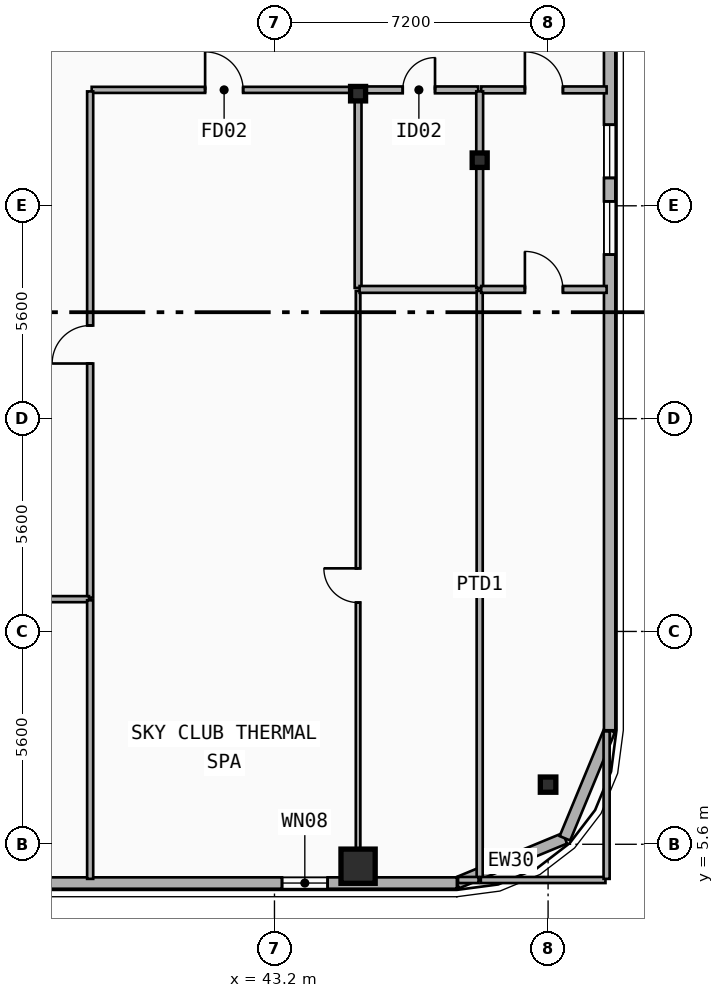
"""IFC4 building model, lengths in metres.
Left out: names, types, materials, properties, quantities, classifications, styles, units other than length and angle.
Written with IfcOpenShell. Run it as: python <this file> out.ifc"""

import sys

from ifc_helpers import new_model, si_unit, direction, frame, frame_2d, origin, origin_2d, place, context, subcontext, project, spatial, rectangle, i_section, extrude, element, fill, save


model = new_model("IFC4")
c1 = context("Model", 3, precision=1e-05, world=origin(), true_north=direction((0.0, 1.0)))
c2 = subcontext(c1, "Body", "Model", "MODEL_VIEW")
j1 = project(units=[si_unit("LENGTHUNIT", "METRE"), si_unit("PLANEANGLEUNIT", "RADIAN")], contexts=[c1])
p1 = place(None, origin())
s1 = spatial("IfcSite", under=j1, at=p1, CompositionType="ELEMENT")
p2 = place(p1, origin())
s2 = spatial("IfcBuilding", under=s1, at=p2, CompositionType="ELEMENT")
p3 = place(p2, frame((0.0, 0.0, 232.8)))
s3 = spatial("IfcBuildingStorey", under=s2, at=p3, CompositionType="ELEMENT", Elevation=232.8)
p4 = place(p3, frame((45.4, 25.35, 0.0), z_axis=(0.0, 0.0, 1.0), x_axis=(1.0, 0.0, 0.0)))
e1 = element("IfcColumn", 1, at=p4, inside=s3, PredefinedType="COLUMN", context=c2, shape_type="SweptSolid", body=[
    extrude(i_section(OverallWidth=0.395, OverallDepth=0.38, WebThickness=0.019, FlangeThickness=0.03, FilletRadius=0.015, at=origin_2d()), origin(), (0.0, 0.0, 1.0), 3.6),
])
p5 = place(p3, frame((45.4, 5.132, 0.0), z_axis=(0.0, -0.090237335163, 0.995920289653), x_axis=(1.0, 0.0, 0.0)))
e2 = element("IfcColumn", 2, at=p5, inside=s3, PredefinedType="COLUMN", context=c2, shape_type="SweptSolid", body=[
    extrude(rectangle(XDim=0.9, YDim=0.9, at=origin_2d()), origin(), (0.0, 0.0, 1.0), 3.615),
])
p6 = place(p3, frame((48.6, 23.6, 0.0), z_axis=(0.0, 0.0, 1.0), x_axis=(1.0, 0.0, 0.0)))
e3 = element("IfcColumn", 3, at=p6, inside=s3, PredefinedType="COLUMN", context=c2, shape_type="SweptSolid", body=[
    extrude(i_section(OverallWidth=0.395, OverallDepth=0.38, WebThickness=0.019, FlangeThickness=0.03, FilletRadius=0.015, at=origin_2d()), origin(), (0.0, 0.0, 1.0), 3.6),
])
p7 = place(p3, frame((50.4, 7.266, 0.0), z_axis=(0.0, -0.079906436036, 0.996802368316), x_axis=(1.0, 0.0, 0.0)))
e4 = element("IfcColumn", 4, at=p7, inside=s3, PredefinedType="COLUMN", context=c2, shape_type="SweptSolid", body=[
    extrude(i_section(OverallWidth=0.408, OverallDepth=0.4, WebThickness=0.025, FlangeThickness=0.039, FilletRadius=0.015, at=origin_2d()), origin(), (0.0, 0.0, 1.0), 3.611),
])
p8 = place(p3, frame((50.843, 5.757, 0.0), z_axis=(0.0, 0.0, 1.0), x_axis=(-0.92389884758, -0.382636798336, 0.0)))
e5 = element("IfcWall", 5, at=p8, inside=s3, PredefinedType="SOLIDWALL", context=c2, shape_type="SweptSolid", body=[
    extrude(rectangle(XDim=3.077, YDim=0.3, at=frame_2d((1.538, 0.0))), origin(), (0.0, 0.0, 1.0), 3.34),
])
p9 = place(p3, frame((52.02, 8.6, 0.0), z_axis=(0.0, 0.0, 1.0), x_axis=(-0.382676475685, -0.923882414032, 0.0)))
e6 = element("IfcWall", 6, at=p9, inside=s3, PredefinedType="SOLIDWALL", context=c2, shape_type="SweptSolid", body=[
    extrude(rectangle(XDim=3.077, YDim=0.3, at=frame_2d((1.539, 0.0))), origin(), (0.0, 0.0, 1.0), 3.34),
])
p10 = place(p3, frame((52.02, 37.2, 0.0), z_axis=(0.0, 0.0, 1.0), x_axis=(0.0, -1.0, 0.0)))
e7 = element("IfcWall", 7, at=p10, inside=s3, PredefinedType="SOLIDWALL", context=c2, shape_type="SweptSolid", body=[
    extrude(rectangle(XDim=28.6, YDim=0.3, at=frame_2d((14.3, 0.0))), origin(), (0.0, 0.0, 1.0), 3.34),
])
p11 = place(p10, frame((2.38, 0.0, 0.34)))
e8 = element("IfcOpeningElement", 8, at=p11, cuts=e7, PredefinedType="OPENING", context=c2, shape_type="SweptSolid", body=[
    extrude(rectangle(XDim=1.4, YDim=2.1, at=frame_2d((0.7, 1.05))), frame((0.0, 0.16, 0.0), z_axis=(0.0, -1.0, 0.0), x_axis=(1.0, 0.0, 0.0)), (0.0, 0.0, 1.0), 0.32),
])
p12 = place(p10, frame((5.84, 0.0, 0.34)))
e9 = element("IfcOpeningElement", 9, at=p12, cuts=e7, PredefinedType="OPENING", context=c2, shape_type="SweptSolid", body=[
    extrude(rectangle(XDim=1.4, YDim=2.1, at=frame_2d((0.7, 1.05))), frame((0.0, 0.16, 0.0), z_axis=(0.0, -1.0, 0.0), x_axis=(1.0, 0.0, 0.0)), (0.0, 0.0, 1.0), 0.32),
])
p13 = place(p10, frame((12.667, 0.0, 0.34)))
e10 = element("IfcOpeningElement", 10, at=p13, cuts=e7, PredefinedType="OPENING", context=c2, shape_type="SweptSolid", body=[
    extrude(rectangle(XDim=1.4, YDim=2.1, at=frame_2d((0.7, 1.05))), frame((0.0, 0.16, 0.0), z_axis=(0.0, -1.0, 0.0), x_axis=(1.0, 0.0, 0.0)), (0.0, 0.0, 1.0), 0.32),
])
p14 = place(p10, frame((14.683, 0.0, 0.34)))
e11 = element("IfcOpeningElement", 11, at=p14, cuts=e7, PredefinedType="OPENING", context=c2, shape_type="SweptSolid", body=[
    extrude(rectangle(XDim=1.4, YDim=2.1, at=frame_2d((0.7, 1.05))), frame((0.0, 0.16, 0.0), z_axis=(0.0, -1.0, 0.0), x_axis=(1.0, 0.0, 0.0)), (0.0, 0.0, 1.0), 0.32),
])
p15 = place(p3, frame((48.0, 4.58, 0.0), z_axis=(0.0, 0.0, 1.0), x_axis=(-1.0, 0.0, 0.0)))
e12 = element("IfcWall", 12, at=p15, inside=s3, PredefinedType="SOLIDWALL", context=c2, shape_type="SweptSolid", body=[
    extrude(rectangle(XDim=38.4, YDim=0.3, at=frame_2d((19.2, 0.0))), origin(), (0.0, 0.0, 1.0), 3.0),
])
p16 = place(p15, frame((36.641, 0.0, 0.75)))
e13 = element("IfcOpeningElement", 13, at=p16, cuts=e12, PredefinedType="OPENING", context=c2, shape_type="SweptSolid", body=[
    extrude(rectangle(XDim=1.4, YDim=1.8, at=frame_2d((0.7, 0.9))), frame((0.0, 0.16, 0.0), z_axis=(0.0, -1.0, 0.0), x_axis=(1.0, 0.0, 0.0)), (0.0, 0.0, 1.0), 0.32),
])
p17 = place(p15, frame((33.598, 0.0, 0.34)))
e14 = element("IfcOpeningElement", 14, at=p17, cuts=e12, PredefinedType="OPENING", context=c2, shape_type="SweptSolid", body=[
    extrude(rectangle(XDim=1.4, YDim=1.8, at=frame_2d((0.7, 0.9))), frame((0.0, 0.16, 0.0), z_axis=(0.0, -1.0, 0.0), x_axis=(1.0, 0.0, 0.0)), (0.0, 0.0, 1.0), 0.32),
])
p18 = place(p15, frame((14.425, 0.0, 0.62)))
e15 = element("IfcOpeningElement", 15, at=p18, cuts=e12, PredefinedType="OPENING", context=c2, shape_type="SweptSolid", body=[
    extrude(rectangle(XDim=2.0, YDim=2.2, at=frame_2d((1.0, 1.1))), frame((0.0, 0.16, 0.0), z_axis=(0.0, -1.0, 0.0), x_axis=(1.0, 0.0, 0.0)), (0.0, 0.0, 1.0), 0.32),
])
p19 = place(p15, frame((3.402, 0.0, 1.22)))
e16 = element("IfcOpeningElement", 16, at=p19, cuts=e12, PredefinedType="OPENING", context=c2, shape_type="SweptSolid", body=[
    extrude(rectangle(XDim=1.2, YDim=1.5, at=frame_2d((0.6, 0.75))), frame((0.0, 0.16, 0.0), z_axis=(0.0, -1.0, 0.0), x_axis=(1.0, 0.0, 0.0)), (0.0, 0.0, 1.0), 0.32),
])
p20 = place(p3, frame((38.39, 25.45, 0.0), z_axis=(0.0, 0.0, 1.0), x_axis=(1.0, 0.0, 0.0)))
e17 = element("IfcWall", 17, at=p20, inside=s3, PredefinedType="PARTITIONING", context=c2, shape_type="SweptSolid", body=[
    extrude(rectangle(XDim=6.97, YDim=0.16, at=frame_2d((3.485, 0.0))), origin(), (0.0, 0.0, 1.0), 2.62),
])
p21 = place(p20, frame((2.985, 0.0, 0.0)))
e18 = element("IfcOpeningElement", 18, at=p21, cuts=e17, PredefinedType="OPENING", context=c2, shape_type="SweptSolid", body=[
    extrude(rectangle(XDim=1.0, YDim=2.15, at=frame_2d((0.5, 1.075))), frame((0.0, 0.09, 0.0), z_axis=(0.0, -1.0, 0.0), x_axis=(1.0, 0.0, 0.0)), (0.0, 0.0, 1.0), 0.18),
])
p22 = place(p3, frame((45.44, 25.45, 0.0), z_axis=(0.0, 0.0, 1.0), x_axis=(1.0, 0.0, 0.0)))
e19 = element("IfcWall", 19, at=p22, inside=s3, PredefinedType="PLUMBINGWALL", context=c2, shape_type="SweptSolid", body=[
    extrude(rectangle(XDim=3.12, YDim=0.18, at=frame_2d((1.56, 0.0))), origin(), (0.0, 0.0, 1.0), 2.62),
])
p23 = place(p22, frame((1.135, 0.0, 0.0)))
e20 = element("IfcOpeningElement", 20, at=p23, cuts=e19, PredefinedType="OPENING", context=c2, shape_type="SweptSolid", body=[
    extrude(rectangle(XDim=0.85, YDim=2.1, at=frame_2d((0.425, 1.05))), frame((0.0, 0.1, 0.0), z_axis=(0.0, -1.0, 0.0), x_axis=(1.0, 0.0, 0.0)), (0.0, 0.0, 1.0), 0.2),
])
p24 = place(p3, frame((48.64, 25.45, 0.0), z_axis=(0.0, 0.0, 1.0), x_axis=(1.0, 0.0, 0.0)))
e21 = element("IfcWall", 21, at=p24, inside=s3, PredefinedType="PLUMBINGWALL", context=c2, shape_type="SweptSolid", body=[
    extrude(rectangle(XDim=3.3, YDim=0.18, at=frame_2d((1.65, 0.0))), origin(), (0.0, 0.0, 1.0), 2.67),
])
p25 = place(p24, frame((1.15, 0.0, 0.0)))
e22 = element("IfcOpeningElement", 22, at=p25, cuts=e21, PredefinedType="OPENING", context=c2, shape_type="SweptSolid", body=[
    extrude(rectangle(XDim=1.0, YDim=2.15, at=frame_2d((0.5, 1.075))), frame((0.0, 0.1, 0.0), z_axis=(0.0, -1.0, 0.0), x_axis=(1.0, 0.0, 0.0)), (0.0, 0.0, 1.0), 0.2),
])
p26 = place(p3, frame((38.35, 12.09, 0.0), z_axis=(0.0, 0.0, 1.0), x_axis=(0.0, 1.0, 0.0)))
e23 = element("IfcWall", 23, at=p26, inside=s3, PredefinedType="PARTITIONING", context=c2, shape_type="SweptSolid", body=[
    extrude(rectangle(XDim=13.32, YDim=0.16, at=frame_2d((6.66, 0.0))), origin(), (0.0, 0.0, 1.0), 2.83),
])
p27 = place(p26, frame((6.16, 0.0, 0.0)))
e24 = element("IfcOpeningElement", 24, at=p27, cuts=e23, PredefinedType="OPENING", context=c2, shape_type="SweptSolid", body=[
    extrude(rectangle(XDim=1.0, YDim=2.15, at=frame_2d((0.5, 1.075))), frame((0.0, 0.09, 0.0), z_axis=(0.0, -1.0, 0.0), x_axis=(1.0, 0.0, 0.0)), (0.0, 0.0, 1.0), 0.18),
])
p28 = place(p3, frame((45.4, 20.24, 0.0), z_axis=(0.0, 0.0, 1.0), x_axis=(0.0, 1.0, 0.0)))
e25 = element("IfcWall", 25, at=p28, inside=s3, PredefinedType="PLUMBINGWALL", context=c2, shape_type="SweptSolid", body=[
    extrude(rectangle(XDim=5.17, YDim=0.18, at=frame_2d((2.585, 0.0))), origin(), (0.0, 0.0, 1.0), 2.62),
])
p29 = place(p3, frame((45.4, 4.66, 0.0), z_axis=(0.0, 0.0, 1.0), x_axis=(0.0, 1.0, 0.0)))
e26 = element("IfcWall", 26, at=p29, inside=s3, PredefinedType="PARTITIONING", context=c2, shape_type="SweptSolid", body=[
    extrude(rectangle(XDim=15.5, YDim=0.12, at=frame_2d((7.75, 0.0))), origin(), (0.0, 0.0, 1.0), 2.62),
])
p30 = place(p29, frame((7.3, 0.0, 0.0)))
e27 = element("IfcOpeningElement", 27, at=p30, cuts=e26, PredefinedType="OPENING", context=c2, shape_type="SweptSolid", body=[
    extrude(rectangle(XDim=0.9, YDim=2.1, at=frame_2d((0.45, 1.05))), frame((0.0, 0.07, 0.0), z_axis=(0.0, -1.0, 0.0), x_axis=(1.0, 0.0, 0.0)), (0.0, 0.0, 1.0), 0.14),
])
p31 = place(p3, frame((45.44, 20.2, 0.0), z_axis=(0.0, 0.0, 1.0), x_axis=(1.0, 0.0, 0.0)))
e28 = element("IfcWall", 28, at=p31, inside=s3, PredefinedType="PLUMBINGWALL", context=c2, shape_type="SweptSolid", body=[
    extrude(rectangle(XDim=3.12, YDim=0.18, at=frame_2d((1.56, 0.0))), origin(), (0.0, 0.0, 1.0), 2.62),
])
p32 = place(p3, frame((48.6, 20.24, 0.0), z_axis=(0.0, 0.0, 1.0), x_axis=(0.0, 1.0, 0.0)))
e29 = element("IfcWall", 29, at=p32, inside=s3, PredefinedType="PLUMBINGWALL", context=c2, shape_type="SweptSolid", body=[
    extrude(rectangle(XDim=5.17, YDim=0.18, at=frame_2d((2.585, 0.0))), origin(), (0.0, 0.0, 1.0), 2.82),
])
p33 = place(p3, frame((48.6, 4.66, 0.0), z_axis=(0.0, 0.0, 1.0), x_axis=(0.0, 1.0, 0.0)))
e30 = element("IfcWall", 30, at=p33, inside=s3, PredefinedType="PARTITIONING", context=c2, shape_type="SweptSolid", body=[
    extrude(rectangle(XDim=15.5, YDim=0.16, at=frame_2d((7.75, 0.0))), origin(), (0.0, 0.0, 1.0), 2.82),
])
p34 = place(p3, frame((48.64, 20.2, 0.0), z_axis=(0.0, 0.0, 1.0), x_axis=(1.0, 0.0, 0.0)))
e31 = element("IfcWall", 31, at=p34, inside=s3, PredefinedType="PLUMBINGWALL", context=c2, shape_type="SweptSolid", body=[
    extrude(rectangle(XDim=3.3, YDim=0.18, at=frame_2d((1.65, 0.0))), origin(), (0.0, 0.0, 1.0), 2.67),
])
p35 = place(p34, frame((1.15, 0.0, 0.0)))
e32 = element("IfcOpeningElement", 32, at=p35, cuts=e31, PredefinedType="OPENING", context=c2, shape_type="SweptSolid", body=[
    extrude(rectangle(XDim=1.0, YDim=2.15, at=frame_2d((0.5, 1.075))), frame((0.0, 0.1, 0.0), z_axis=(0.0, -1.0, 0.0), x_axis=(1.0, 0.0, 0.0)), (0.0, 0.0, 1.0), 0.2),
])
p36 = place(p3, frame((36.38, 12.05, 0.0), z_axis=(0.0, 0.0, 1.0), x_axis=(1.0, 0.0, 0.0)))
e33 = element("IfcWall", 33, at=p36, inside=s3, PredefinedType="PARTITIONING", context=c2, shape_type="SweptSolid", body=[
    extrude(rectangle(XDim=1.94, YDim=0.16, at=frame_2d((0.97, 0.0))), origin(), (0.0, 0.0, 1.0), 2.62),
])
p37 = place(p3, frame((38.35, 4.69, 0.0), z_axis=(0.0, 0.0, 1.0), x_axis=(0.0, 1.0, 0.0)))
e34 = element("IfcWall", 34, at=p37, inside=s3, PredefinedType="PARTITIONING", context=c2, shape_type="SweptSolid", body=[
    extrude(rectangle(XDim=7.33, YDim=0.16, at=frame_2d((3.665, 0.0))), origin(), (0.0, 0.0, 1.0), 2.83),
])
p38 = place(p3, frame((48.03, 4.66, 0.0), z_axis=(0.0, 0.0, 1.0), x_axis=(1.0, 0.0, 0.0)))
e35 = element("IfcWall", 35, at=p38, inside=s3, PredefinedType="PARTITIONING", context=c2, shape_type="SweptSolid", body=[
    extrude(rectangle(XDim=0.54, YDim=0.16, at=frame_2d((0.27, 0.0))), origin(), (0.0, 0.0, 1.0), 3.34),
])
p39 = place(p3, frame((48.63, 4.66, 0.0), z_axis=(0.0, 0.0, 1.0), x_axis=(1.0, 0.0, 0.0)))
e36 = element("IfcWall", 36, at=p39, inside=s3, PredefinedType="PARTITIONING", context=c2, shape_type="SweptSolid", body=[
    extrude(rectangle(XDim=3.28, YDim=0.16, at=frame_2d((1.64, 0.0))), origin(), (0.0, 0.0, 1.0), 3.34),
])
p40 = place(p3, frame((51.94, 4.69, 0.0), z_axis=(0.0, 0.0, 1.0), x_axis=(0.0, 1.0, 0.0)))
e37 = element("IfcWall", 37, at=p40, inside=s3, PredefinedType="PARTITIONING", context=c2, shape_type="SweptSolid", body=[
    extrude(rectangle(XDim=3.88, YDim=0.16, at=frame_2d((1.94, 0.0))), origin(), (0.0, 0.0, 1.0), 3.34),
])
p41 = place(p13, origin())
e38 = element("IfcWindow", 38, at=p41, inside=s3, PartitioningType="SINGLE_PANEL", PredefinedType="WINDOW", context=c2, shape_type="SweptSolid", body=[
    extrude(rectangle(XDim=1.4, YDim=2.1, at=frame_2d((0.7, 1.05))), frame((0.0, 0.03, 0.0), z_axis=(0.0, -1.0, 0.0), x_axis=(1.0, 0.0, 0.0)), (0.0, 0.0, 1.0), 0.06),
])
fill(e10, e38)
p42 = place(p14, origin())
e39 = element("IfcWindow", 39, at=p42, inside=s3, PartitioningType="SINGLE_PANEL", PredefinedType="WINDOW", context=c2, shape_type="SweptSolid", body=[
    extrude(rectangle(XDim=1.4, YDim=2.1, at=frame_2d((0.7, 1.05))), frame((0.0, 0.03, 0.0), z_axis=(0.0, -1.0, 0.0), x_axis=(1.0, 0.0, 0.0)), (0.0, 0.0, 1.0), 0.06),
])
fill(e11, e39)
p43 = place(p19, origin())
e40 = element("IfcWindow", 40, at=p43, inside=s3, PartitioningType="SINGLE_PANEL", PredefinedType="WINDOW", context=c2, shape_type="SweptSolid", body=[
    extrude(rectangle(XDim=1.2, YDim=1.5, at=frame_2d((0.6, 0.75))), frame((0.0, 0.03, 0.0), z_axis=(0.0, -1.0, 0.0), x_axis=(1.0, 0.0, 0.0)), (0.0, 0.0, 1.0), 0.06),
])
fill(e16, e40)
p44 = place(p21, origin())
e41 = element("IfcDoor", 41, at=p44, inside=s3, OperationType="SINGLE_SWING_LEFT", PredefinedType="DOOR", context=c2, shape_type="SweptSolid", body=[
    extrude(rectangle(XDim=1.0, YDim=2.15, at=frame_2d((0.5, 1.075))), frame((0.0, 0.025, 0.0), z_axis=(0.0, -1.0, 0.0), x_axis=(1.0, 0.0, 0.0)), (0.0, 0.0, 1.0), 0.05),
])
fill(e18, e41)
p45 = place(p23, origin())
e42 = element("IfcDoor", 42, at=p45, inside=s3, OperationType="SINGLE_SWING_RIGHT", PredefinedType="DOOR", context=c2, shape_type="SweptSolid", body=[
    extrude(rectangle(XDim=0.85, YDim=2.1, at=frame_2d((0.425, 1.05))), frame((0.0, 0.025, 0.0), z_axis=(0.0, -1.0, 0.0), x_axis=(1.0, 0.0, 0.0)), (0.0, 0.0, 1.0), 0.05),
])
fill(e20, e42)
p46 = place(p25, origin())
e43 = element("IfcDoor", 43, at=p46, inside=s3, OperationType="SINGLE_SWING_LEFT", PredefinedType="DOOR", context=c2, shape_type="SweptSolid", body=[
    extrude(rectangle(XDim=1.0, YDim=2.15, at=frame_2d((0.5, 1.075))), frame((0.0, 0.025, 0.0), z_axis=(0.0, -1.0, 0.0), x_axis=(1.0, 0.0, 0.0)), (0.0, 0.0, 1.0), 0.05),
])
fill(e22, e43)
p47 = place(p27, origin())
e44 = element("IfcDoor", 44, at=p47, inside=s3, OperationType="SINGLE_SWING_LEFT", PredefinedType="DOOR", context=c2, shape_type="SweptSolid", body=[
    extrude(rectangle(XDim=1.0, YDim=2.15, at=frame_2d((0.5, 1.075))), frame((0.0, 0.025, 0.0), z_axis=(0.0, -1.0, 0.0), x_axis=(1.0, 0.0, 0.0)), (0.0, 0.0, 1.0), 0.05),
])
fill(e24, e44)
p48 = place(p30, origin())
e45 = element("IfcDoor", 45, at=p48, inside=s3, OperationType="SINGLE_SWING_RIGHT", PredefinedType="DOOR", context=c2, shape_type="SweptSolid", body=[
    extrude(rectangle(XDim=0.9, YDim=2.1, at=frame_2d((0.45, 1.05))), frame((0.0, 0.025, 0.0), z_axis=(0.0, -1.0, 0.0), x_axis=(1.0, 0.0, 0.0)), (0.0, 0.0, 1.0), 0.05),
])
fill(e27, e45)
p49 = place(p35, origin())
e46 = element("IfcDoor", 46, at=p49, inside=s3, OperationType="SINGLE_SWING_LEFT", PredefinedType="DOOR", context=c2, shape_type="SweptSolid", body=[
    extrude(rectangle(XDim=1.0, YDim=2.15, at=frame_2d((0.5, 1.075))), frame((0.0, 0.025, 0.0), z_axis=(0.0, -1.0, 0.0), x_axis=(1.0, 0.0, 0.0)), (0.0, 0.0, 1.0), 0.05),
])
fill(e32, e46)
save(model, sys.argv[1])
